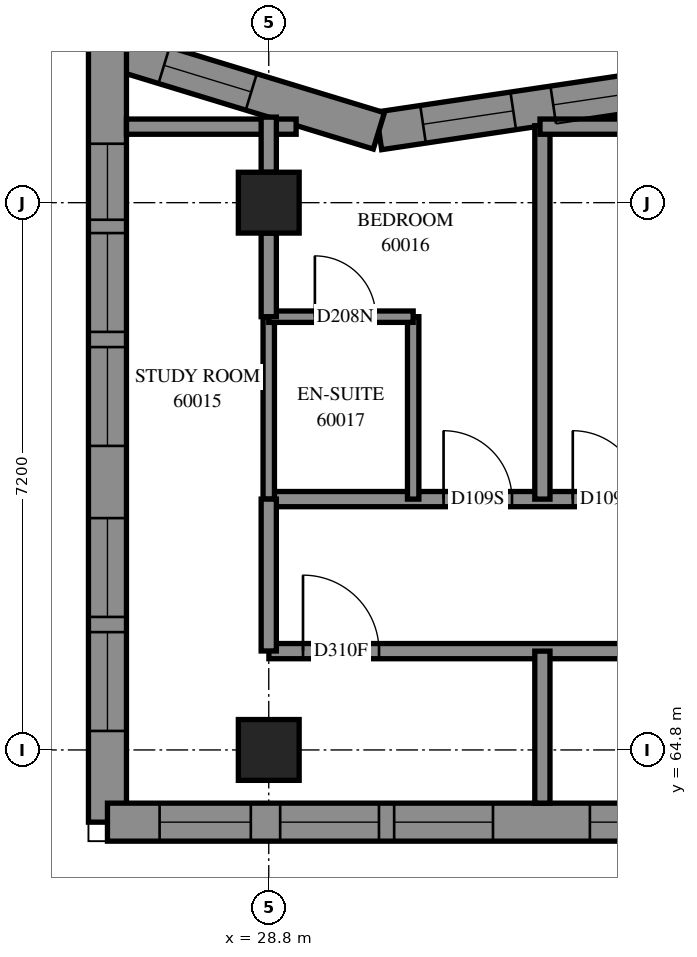
"""IFC4 building model, lengths in metres.
Left out: names, types, materials, properties, quantities, classifications, styles, units other than length and angle.
Written with IfcOpenShell. Run it as: python <this file> out.ifc"""

import sys

from ifc_helpers import new_model, si_unit, direction, frame, frame_2d, origin, origin_2d, place, context, subcontext, project, spatial, polyline, rectangle, outline, extrude, element, fill, save


model = new_model("IFC4")
c1 = context("Model", 3, precision=1e-05, world=origin(), true_north=direction((0.0, 1.0)))
c2 = subcontext(c1, "Body", "Model", "MODEL_VIEW")
j1 = project(units=[si_unit("LENGTHUNIT", "METRE"), si_unit("PLANEANGLEUNIT", "RADIAN")], contexts=[c1])
p1 = place(None, origin())
s1 = spatial("IfcSite", under=j1, at=p1, CompositionType="ELEMENT")
p2 = place(p1, origin())
s2 = spatial("IfcBuilding", under=s1, at=p2, CompositionType="ELEMENT")
p3 = place(p2, frame((0.0, 0.0, 220.2)))
s3 = spatial("IfcBuildingStorey", under=s2, at=p3, CompositionType="ELEMENT", Elevation=220.2)
for number, where, z_axis, x_axis in (
    (1, (28.8, 64.8, 0.0), (0.0, 0.0, 1.0), (1.0, 0.0, 0.0)),
    (2, (28.8, 72.0, 0.0), (0.0, 0.0, 1.0), (1.0, 0.0, 0.0)),
):
    element("IfcColumn", number, at=place(p3, frame(where, z_axis=z_axis, x_axis=x_axis)), inside=s3, PredefinedType="COLUMN", context=c2, shape_type="SweptSolid", body=[
        extrude(rectangle(XDim=0.8, YDim=0.8, at=origin_2d()), origin(), (0.0, 0.0, 1.0), 3.1),
    ])
p4 = place(p3, frame((34.107, 73.519, 0.0), z_axis=(0.0, 0.0, 1.0), x_axis=(-0.9890858863, -0.1473401149, 0.0)))
e3 = element("IfcWall", 3, at=p4, inside=s3, PredefinedType="SOLIDWALL", context=c2, shape_type="SweptSolid", body=[
    extrude(outline(polyline([(-0.037, -0.25), (3.845, -0.25), (3.958, 0.25), (0.037, 0.25), (-0.037, -0.25)])), origin(), (0.0, 0.0, 1.0), 3.1),
])
p5 = place(p4, frame((0.382, 0.0, 0.45)))
e4 = element("IfcOpeningElement", 4, at=p5, cuts=e3, PredefinedType="OPENING", context=c2, shape_type="SweptSolid", body=[
    extrude(rectangle(XDim=1.2, YDim=2.5, at=frame_2d((0.6, 1.25))), frame((0.0, 0.26, 0.0), z_axis=(0.0, -1.0, 0.0), x_axis=(1.0, 0.0, 0.0)), (0.0, 0.0, 1.0), 0.52),
])
p6 = place(p4, frame((2.114, 0.0, 0.45)))
e5 = element("IfcOpeningElement", 5, at=p6, cuts=e3, PredefinedType="OPENING", context=c2, shape_type="SweptSolid", body=[
    extrude(rectangle(XDim=1.2, YDim=2.5, at=frame_2d((0.6, 1.25))), frame((0.0, 0.26, 0.0), z_axis=(0.0, -1.0, 0.0), x_axis=(1.0, 0.0, 0.0)), (0.0, 0.0, 1.0), 0.52),
])
p7 = place(p3, frame((30.249, 72.944, 0.0), z_axis=(0.0, 0.0, 1.0), x_axis=(-0.9564351236, 0.2919449508, 0.0)))
e6 = element("IfcWall", 6, at=p7, inside=s3, PredefinedType="SOLIDWALL", context=c2, shape_type="SweptSolid", body=[
    extrude(outline(polyline([(0.056, -0.25), (4.071, -0.25), (3.396, 0.25), (-0.056, 0.25), (0.056, -0.25)])), origin(), (0.0, 0.0, 1.0), 3.1),
])
p8 = place(p7, frame((1.755, 0.0, 0.45)))
e7 = element("IfcOpeningElement", 7, at=p8, cuts=e6, PredefinedType="OPENING", context=c2, shape_type="SweptSolid", body=[
    extrude(rectangle(XDim=1.2, YDim=2.5, at=frame_2d((0.6, 1.25))), frame((0.0, 0.26, 0.0), z_axis=(0.0, -1.0, 0.0), x_axis=(1.0, 0.0, 0.0)), (0.0, 0.0, 1.0), 0.52),
])
p9 = place(p3, frame((26.678, 74.034, 0.0), z_axis=(0.0, 0.0, 1.0), x_axis=(0.0, -1.0, 0.0)))
e8 = element("IfcWall", 8, at=p9, inside=s3, PredefinedType="SOLIDWALL", context=c2, shape_type="SweptSolid", body=[
    extrude(outline(polyline([(-0.338, -0.25), (10.434, -0.25), (9.934, 0.25), (0.338, 0.25), (-0.338, -0.25)])), origin(), (0.0, 0.0, 1.0), 3.1),
])
p10 = place(p9, frame((2.434, 0.0, 0.45)))
e9 = element("IfcOpeningElement", 9, at=p10, cuts=e8, PredefinedType="OPENING", context=c2, shape_type="SweptSolid", body=[
    extrude(rectangle(XDim=1.3, YDim=2.5, at=frame_2d((0.65, 1.25))), frame((0.0, 0.26, 0.0), z_axis=(0.0, -1.0, 0.0), x_axis=(1.0, 0.0, 0.0)), (0.0, 0.0, 1.0), 0.52),
])
p11 = place(p9, frame((3.934, 0.0, 0.45)))
e10 = element("IfcOpeningElement", 10, at=p11, cuts=e8, PredefinedType="OPENING", context=c2, shape_type="SweptSolid", body=[
    extrude(rectangle(XDim=1.3, YDim=2.5, at=frame_2d((0.65, 1.25))), frame((0.0, 0.26, 0.0), z_axis=(0.0, -1.0, 0.0), x_axis=(1.0, 0.0, 0.0)), (0.0, 0.0, 1.0), 0.52),
])
p12 = place(p9, frame((6.184, 0.0, 0.45)))
e11 = element("IfcOpeningElement", 11, at=p12, cuts=e8, PredefinedType="OPENING", context=c2, shape_type="SweptSolid", body=[
    extrude(rectangle(XDim=1.3, YDim=2.5, at=frame_2d((0.65, 1.25))), frame((0.0, 0.26, 0.0), z_axis=(0.0, -1.0, 0.0), x_axis=(1.0, 0.0, 0.0)), (0.0, 0.0, 1.0), 0.52),
])
p13 = place(p9, frame((7.684, 0.0, 0.45)))
e12 = element("IfcOpeningElement", 12, at=p13, cuts=e8, PredefinedType="OPENING", context=c2, shape_type="SweptSolid", body=[
    extrude(rectangle(XDim=1.3, YDim=2.5, at=frame_2d((0.65, 1.25))), frame((0.0, 0.26, 0.0), z_axis=(0.0, -1.0, 0.0), x_axis=(1.0, 0.0, 0.0)), (0.0, 0.0, 1.0), 0.52),
])
p14 = place(p9, frame((1.259, 0.0, 0.45)))
e13 = element("IfcOpeningElement", 13, at=p14, cuts=e8, PredefinedType="OPENING", context=c2, shape_type="SweptSolid", body=[
    extrude(rectangle(XDim=1.0, YDim=2.5, at=frame_2d((0.5, 1.25))), frame((0.0, 0.26, 0.0), z_axis=(0.0, -1.0, 0.0), x_axis=(1.0, 0.0, 0.0)), (0.0, 0.0, 1.0), 0.52),
])
p15 = place(p3, frame((26.678, 63.85, 0.0), z_axis=(0.0, 0.0, 1.0), x_axis=(1.0, 0.0, 0.0)))
e14 = element("IfcWall", 14, at=p15, inside=s3, PredefinedType="SOLIDWALL", context=c2, shape_type="SweptSolid", body=[
    extrude(outline(polyline([(-0.25, -0.25), (8.122, -0.25), (8.622, 0.25), (0.25, 0.25), (-0.25, -0.25)])), origin(), (0.0, 0.0, 1.0), 3.1),
])
p16 = place(p15, frame((2.272, 0.0, 0.45)))
e15 = element("IfcOpeningElement", 15, at=p16, cuts=e14, PredefinedType="OPENING", context=c2, shape_type="SweptSolid", body=[
    extrude(rectangle(XDim=1.3, YDim=2.5, at=frame_2d((0.65, 1.25))), frame((0.0, 0.26, 0.0), z_axis=(0.0, -1.0, 0.0), x_axis=(1.0, 0.0, 0.0)), (0.0, 0.0, 1.0), 0.52),
])
p17 = place(p15, frame((3.772, 0.0, 0.45)))
e16 = element("IfcOpeningElement", 16, at=p17, cuts=e14, PredefinedType="OPENING", context=c2, shape_type="SweptSolid", body=[
    extrude(rectangle(XDim=1.3, YDim=2.5, at=frame_2d((0.65, 1.25))), frame((0.0, 0.26, 0.0), z_axis=(0.0, -1.0, 0.0), x_axis=(1.0, 0.0, 0.0)), (0.0, 0.0, 1.0), 0.52),
])
p18 = place(p15, frame((0.686, 0.0, 0.45)))
e17 = element("IfcOpeningElement", 17, at=p18, cuts=e14, PredefinedType="OPENING", context=c2, shape_type="SweptSolid", body=[
    extrude(rectangle(XDim=1.2, YDim=2.5, at=frame_2d((0.6, 1.25))), frame((0.0, 0.26, 0.0), z_axis=(0.0, -1.0, 0.0), x_axis=(1.0, 0.0, 0.0)), (0.0, 0.0, 1.0), 0.52),
])
p19 = place(p15, frame((6.347, 0.0, 0.45)))
e18 = element("IfcOpeningElement", 18, at=p19, cuts=e14, PredefinedType="OPENING", context=c2, shape_type="SweptSolid", body=[
    extrude(rectangle(XDim=1.2, YDim=2.5, at=frame_2d((0.6, 1.25))), frame((0.0, 0.26, 0.0), z_axis=(0.0, -1.0, 0.0), x_axis=(1.0, 0.0, 0.0)), (0.0, 0.0, 1.0), 0.52),
])
p20 = place(p3, frame((28.8, 68.1, 0.0), z_axis=(0.0, 0.0, 1.0), x_axis=(1.0, 0.0, 0.0)))
e19 = element("IfcWall", 19, at=p20, inside=s3, PredefinedType="PARTITIONING", context=c2, shape_type="SweptSolid", body=[
    extrude(rectangle(XDim=11.8, YDim=0.2, at=frame_2d((5.9, 0.0))), origin(), (0.0, 0.0, 1.0), 3.1),
])
p21 = place(p20, frame((2.3, 0.0, 0.0)))
e20 = element("IfcOpeningElement", 20, at=p21, cuts=e19, PredefinedType="OPENING", context=c2, shape_type="SweptSolid", body=[
    extrude(rectangle(XDim=0.9, YDim=2.1, at=frame_2d((0.45, 1.05))), frame((0.0, 0.11, 0.0), z_axis=(0.0, -1.0, 0.0), x_axis=(1.0, 0.0, 0.0)), (0.0, 0.0, 1.0), 0.22),
])
p22 = place(p20, frame((4.0, 0.0, 0.0)))
e21 = element("IfcOpeningElement", 21, at=p22, cuts=e19, PredefinedType="OPENING", context=c2, shape_type="SweptSolid", body=[
    extrude(rectangle(XDim=0.9, YDim=2.1, at=frame_2d((0.45, 1.05))), frame((0.0, 0.11, 0.0), z_axis=(0.0, -1.0, 0.0), x_axis=(1.0, 0.0, 0.0)), (0.0, 0.0, 1.0), 0.22),
])
p23 = place(p20, frame((9.5, 0.0, 0.0)))
e22 = element("IfcOpeningElement", 22, at=p23, cuts=e19, PredefinedType="OPENING", context=c2, shape_type="SweptSolid", body=[
    extrude(rectangle(XDim=0.9, YDim=2.1, at=frame_2d((0.45, 1.05))), frame((0.0, 0.11, 0.0), z_axis=(0.0, -1.0, 0.0), x_axis=(1.0, 0.0, 0.0)), (0.0, 0.0, 1.0), 0.22),
])
p24 = place(p3, frame((28.802, 66.1, 0.0), z_axis=(0.0, 0.0, 1.0), x_axis=(1.0, 0.0, 0.0)))
e23 = element("IfcWall", 23, at=p24, inside=s3, PredefinedType="PARTITIONING", context=c2, shape_type="SweptSolid", body=[
    extrude(rectangle(XDim=9.798, YDim=0.2, at=frame_2d((4.899, 0.0))), origin(), (0.0, 0.0, 1.0), 3.1),
])
p25 = place(p24, frame((0.449, 0.0, 0.0)))
e24 = element("IfcOpeningElement", 24, at=p25, cuts=e23, PredefinedType="OPENING", context=c2, shape_type="SweptSolid", body=[
    extrude(rectangle(XDim=1.0, YDim=2.1, at=frame_2d((0.5, 1.05))), frame((0.0, 0.11, 0.0), z_axis=(0.0, -1.0, 0.0), x_axis=(1.0, 0.0, 0.0)), (0.0, 0.0, 1.0), 0.22),
])
p26 = place(p24, frame((5.459, 0.0, 0.0)))
e25 = element("IfcOpeningElement", 25, at=p26, cuts=e23, PredefinedType="OPENING", context=c2, shape_type="SweptSolid", body=[
    extrude(rectangle(XDim=1.0, YDim=2.1, at=frame_2d((0.5, 1.05))), frame((0.0, 0.11, 0.0), z_axis=(0.0, -1.0, 0.0), x_axis=(1.0, 0.0, 0.0)), (0.0, 0.0, 1.0), 0.22),
])
p27 = place(p3, frame((32.4, 68.1, 0.0), z_axis=(0.0, 0.0, 1.0), x_axis=(0.0, 1.0, 0.0)))
e26 = element("IfcWall", 26, at=p27, inside=s3, PredefinedType="PARTITIONING", context=c2, shape_type="SweptSolid", body=[
    extrude(rectangle(XDim=4.912, YDim=0.2, at=frame_2d((2.456, 0.0))), origin(), (0.0, 0.0, 1.0), 3.1),
])
p28 = place(p3, frame((32.368, 73.0, 0.0), z_axis=(0.0, 0.0, 1.0), x_axis=(1.0, 0.0, 0.0)))
e27 = element("IfcWall", 27, at=p28, inside=s3, PredefinedType="PARTITIONING", context=c2, shape_type="SweptSolid", body=[
    extrude(rectangle(XDim=3.478, YDim=0.2, at=frame_2d((1.739, 0.0))), origin(), (0.0, 0.0, 1.0), 3.1),
])
p29 = place(p3, frame((28.8, 68.1, 0.0), z_axis=(0.0, 0.0, 1.0), x_axis=(0.0, 1.0, 0.0)))
e28 = element("IfcWall", 28, at=p29, inside=s3, PredefinedType="PARTITIONING", context=c2, shape_type="SweptSolid", body=[
    extrude(rectangle(XDim=2.4, YDim=0.15, at=frame_2d((1.2, 0.0))), origin(), (0.0, 0.0, 1.0), 2.6),
])
p30 = place(p3, frame((30.7, 68.1, 0.0), z_axis=(0.0, 0.0, 1.0), x_axis=(0.0, 1.0, 0.0)))
e29 = element("IfcWall", 29, at=p30, inside=s3, PredefinedType="PARTITIONING", context=c2, shape_type="SweptSolid", body=[
    extrude(rectangle(XDim=2.4, YDim=0.15, at=frame_2d((1.2, 0.0))), origin(), (0.0, 0.0, 1.0), 3.1),
])
p31 = place(p3, frame((26.928, 73.0, 0.0), z_axis=(0.0, 0.0, 1.0), x_axis=(1.0, 0.0, 0.0)))
e30 = element("IfcWall", 30, at=p31, inside=s3, PredefinedType="PARTITIONING", context=c2, shape_type="SweptSolid", body=[
    extrude(rectangle(XDim=2.232, YDim=0.2, at=frame_2d((1.116, 0.0))), origin(), (0.0, 0.0, 1.0), 3.1),
])
p32 = place(p3, frame((28.8, 66.102, 0.0), z_axis=(0.0, 0.0, 1.0), x_axis=(0.0, 1.0, 0.0)))
e31 = element("IfcWall", 31, at=p32, inside=s3, PredefinedType="PARTITIONING", context=c2, shape_type="SweptSolid", body=[
    extrude(rectangle(XDim=1.998, YDim=0.2, at=frame_2d((0.999, 0.0))), origin(), (0.0, 0.0, 1.0), 2.6),
])
p33 = place(p3, frame((32.4, 64.1, 0.0), z_axis=(0.0, 0.0, 1.0), x_axis=(0.0, 1.0, 0.0)))
e32 = element("IfcWall", 32, at=p33, inside=s3, PredefinedType="PARTITIONING", context=c2, shape_type="SweptSolid", body=[
    extrude(rectangle(XDim=2.0, YDim=0.2, at=frame_2d((1.0, 0.0))), origin(), (0.0, 0.0, 1.0), 3.1),
])
p34 = place(p3, frame((28.8, 70.5, 0.0), z_axis=(0.0, 0.0, 1.0), x_axis=(1.0, 0.0, 0.0)))
e33 = element("IfcWall", 33, at=p34, inside=s3, PredefinedType="PARTITIONING", context=c2, shape_type="SweptSolid", body=[
    extrude(rectangle(XDim=1.9, YDim=0.15, at=frame_2d((0.95, 0.0))), origin(), (0.0, 0.0, 1.0), 3.1),
])
p35 = place(p34, frame((0.607, 0.0, 0.0)))
e34 = element("IfcOpeningElement", 34, at=p35, cuts=e33, PredefinedType="OPENING", context=c2, shape_type="SweptSolid", body=[
    extrude(rectangle(XDim=0.8, YDim=2.1, at=frame_2d((0.4, 1.05))), frame((0.0, 0.085, 0.0), z_axis=(0.0, -1.0, 0.0), x_axis=(1.0, 0.0, 0.0)), (0.0, 0.0, 1.0), 0.17),
])
p36 = place(p3, frame((28.8, 70.5, 0.0), z_axis=(0.0, 0.0, 1.0), x_axis=(0.0, 1.0, 0.0)))
e35 = element("IfcWall", 35, at=p36, inside=s3, PredefinedType="PARTITIONING", context=c2, shape_type="SweptSolid", body=[
    extrude(rectangle(XDim=1.1, YDim=0.2, at=frame_2d((0.55, 0.0))), origin(), (0.0, 0.0, 1.0), 2.6),
])
p37 = place(p3, frame((28.8, 72.4, 0.0), z_axis=(0.0, 0.0, 1.0), x_axis=(0.0, 1.0, 0.0)))
e36 = element("IfcWall", 36, at=p37, inside=s3, PredefinedType="PARTITIONING", context=c2, shape_type="SweptSolid", body=[
    extrude(rectangle(XDim=0.725, YDim=0.2, at=frame_2d((0.363, 0.0))), origin(), (0.0, 0.0, 1.0), 3.1),
])
p38 = place(p5, origin())
e37 = element("IfcWindow", 37, at=p38, inside=s3, PartitioningType="SINGLE_PANEL", PredefinedType="WINDOW", context=c2, shape_type="SweptSolid", body=[
    extrude(rectangle(XDim=1.2, YDim=2.5, at=frame_2d((0.6, 1.25))), frame((0.0, 0.15, 0.0), z_axis=(0.0, -1.0, 0.0), x_axis=(1.0, 0.0, 0.0)), (0.0, 0.0, 1.0), 0.06),
])
fill(e4, e37)
p39 = place(p6, origin())
e38 = element("IfcWindow", 38, at=p39, inside=s3, PartitioningType="SINGLE_PANEL", PredefinedType="WINDOW", context=c2, shape_type="SweptSolid", body=[
    extrude(rectangle(XDim=1.2, YDim=2.5, at=frame_2d((0.6, 1.25))), frame((0.0, 0.18, 0.0), z_axis=(0.0, -1.0, 0.0), x_axis=(1.0, 0.0, 0.0)), (0.0, 0.0, 1.0), 0.06),
])
fill(e5, e38)
p40 = place(p8, origin())
e39 = element("IfcWindow", 39, at=p40, inside=s3, PartitioningType="SINGLE_PANEL", PredefinedType="WINDOW", context=c2, shape_type="SweptSolid", body=[
    extrude(rectangle(XDim=1.2, YDim=2.5, at=frame_2d((0.6, 1.25))), frame((0.0, 0.18, 0.0), z_axis=(0.0, -1.0, 0.0), x_axis=(1.0, 0.0, 0.0)), (0.0, 0.0, 1.0), 0.06),
])
fill(e7, e39)
p41 = place(p10, origin())
e40 = element("IfcWindow", 40, at=p41, inside=s3, PartitioningType="SINGLE_PANEL", PredefinedType="WINDOW", context=c2, shape_type="SweptSolid", body=[
    extrude(rectangle(XDim=1.3, YDim=2.5, at=frame_2d((0.65, 1.25))), frame((0.0, 0.18, 0.0), z_axis=(0.0, -1.0, 0.0), x_axis=(1.0, 0.0, 0.0)), (0.0, 0.0, 1.0), 0.06),
])
fill(e9, e40)
p42 = place(p11, origin())
e41 = element("IfcWindow", 41, at=p42, inside=s3, PartitioningType="SINGLE_PANEL", PredefinedType="WINDOW", context=c2, shape_type="SweptSolid", body=[
    extrude(rectangle(XDim=1.3, YDim=2.5, at=frame_2d((0.65, 1.25))), frame((0.0, 0.18, 0.0), z_axis=(0.0, -1.0, 0.0), x_axis=(1.0, 0.0, 0.0)), (0.0, 0.0, 1.0), 0.06),
])
fill(e10, e41)
p43 = place(p12, origin())
e42 = element("IfcWindow", 42, at=p43, inside=s3, PartitioningType="SINGLE_PANEL", PredefinedType="WINDOW", context=c2, shape_type="SweptSolid", body=[
    extrude(rectangle(XDim=1.3, YDim=2.5, at=frame_2d((0.65, 1.25))), frame((0.0, 0.18, 0.0), z_axis=(0.0, -1.0, 0.0), x_axis=(1.0, 0.0, 0.0)), (0.0, 0.0, 1.0), 0.06),
])
fill(e11, e42)
p44 = place(p13, origin())
e43 = element("IfcWindow", 43, at=p44, inside=s3, PartitioningType="SINGLE_PANEL", PredefinedType="WINDOW", context=c2, shape_type="SweptSolid", body=[
    extrude(rectangle(XDim=1.3, YDim=2.5, at=frame_2d((0.65, 1.25))), frame((0.0, 0.18, 0.0), z_axis=(0.0, -1.0, 0.0), x_axis=(1.0, 0.0, 0.0)), (0.0, 0.0, 1.0), 0.06),
])
fill(e12, e43)
p45 = place(p16, origin())
e44 = element("IfcWindow", 44, at=p45, inside=s3, PartitioningType="SINGLE_PANEL", PredefinedType="WINDOW", context=c2, shape_type="SweptSolid", body=[
    extrude(rectangle(XDim=1.3, YDim=2.5, at=frame_2d((0.65, 1.25))), frame((0.0, 0.18, 0.0), z_axis=(0.0, -1.0, 0.0), x_axis=(1.0, 0.0, 0.0)), (0.0, 0.0, 1.0), 0.06),
])
fill(e15, e44)
p46 = place(p17, origin())
e45 = element("IfcWindow", 45, at=p46, inside=s3, PartitioningType="SINGLE_PANEL", PredefinedType="WINDOW", context=c2, shape_type="SweptSolid", body=[
    extrude(rectangle(XDim=1.3, YDim=2.5, at=frame_2d((0.65, 1.25))), frame((0.0, 0.18, 0.0), z_axis=(0.0, -1.0, 0.0), x_axis=(1.0, 0.0, 0.0)), (0.0, 0.0, 1.0), 0.06),
])
fill(e16, e45)
p47 = place(p18, origin())
e46 = element("IfcWindow", 46, at=p47, inside=s3, PartitioningType="SINGLE_PANEL", PredefinedType="WINDOW", context=c2, shape_type="SweptSolid", body=[
    extrude(rectangle(XDim=1.2, YDim=2.5, at=frame_2d((0.6, 1.25))), frame((0.0, 0.18, 0.0), z_axis=(0.0, -1.0, 0.0), x_axis=(1.0, 0.0, 0.0)), (0.0, 0.0, 1.0), 0.06),
])
fill(e17, e46)
p48 = place(p19, origin())
e47 = element("IfcWindow", 47, at=p48, inside=s3, PartitioningType="SINGLE_PANEL", PredefinedType="WINDOW", context=c2, shape_type="SweptSolid", body=[
    extrude(rectangle(XDim=1.2, YDim=2.5, at=frame_2d((0.6, 1.25))), frame((0.0, 0.18, 0.0), z_axis=(0.0, -1.0, 0.0), x_axis=(1.0, 0.0, 0.0)), (0.0, 0.0, 1.0), 0.06),
])
fill(e18, e47)
p49 = place(p25, origin())
e48 = element("IfcDoor", 48, at=p49, inside=s3, OperationType="SINGLE_SWING_LEFT", PredefinedType="DOOR", context=c2, shape_type="SweptSolid", body=[
    extrude(rectangle(XDim=1.0, YDim=2.1, at=frame_2d((0.5, 1.05))), frame((0.0, 0.025, 0.0), z_axis=(0.0, -1.0, 0.0), x_axis=(1.0, 0.0, 0.0)), (0.0, 0.0, 1.0), 0.05),
])
fill(e24, e48)
p50 = place(p21, origin())
e49 = element("IfcDoor", 49, at=p50, inside=s3, OperationType="SINGLE_SWING_RIGHT", PredefinedType="DOOR", context=c2, shape_type="SweptSolid", body=[
    extrude(rectangle(XDim=0.9, YDim=2.1, at=frame_2d((0.45, 1.05))), frame((0.0, 0.025, 0.0), z_axis=(0.0, -1.0, 0.0), x_axis=(1.0, 0.0, 0.0)), (0.0, 0.0, 1.0), 0.05),
])
fill(e20, e49)
p51 = place(p35, origin())
e50 = element("IfcDoor", 50, at=p51, inside=s3, OperationType="SINGLE_SWING_RIGHT", PredefinedType="DOOR", context=c2, shape_type="SweptSolid", body=[
    extrude(rectangle(XDim=0.8, YDim=2.1, at=frame_2d((0.4, 1.05))), frame((0.0, 0.025, 0.0), z_axis=(0.0, -1.0, 0.0), x_axis=(1.0, 0.0, 0.0)), (0.0, 0.0, 1.0), 0.05),
])
fill(e34, e50)
p52 = place(p22, origin())
e51 = element("IfcDoor", 51, at=p52, inside=s3, OperationType="SINGLE_SWING_LEFT", PredefinedType="DOOR", context=c2, shape_type="SweptSolid", body=[
    extrude(rectangle(XDim=0.9, YDim=2.1, at=frame_2d((0.45, 1.05))), frame((0.0, 0.025, 0.0), z_axis=(0.0, -1.0, 0.0), x_axis=(1.0, 0.0, 0.0)), (0.0, 0.0, 1.0), 0.05),
])
fill(e21, e51)
p53 = place(p14, origin())
e52 = element("IfcWindow", 52, at=p53, inside=s3, PartitioningType="SINGLE_PANEL", PredefinedType="WINDOW", context=c2, shape_type="SweptSolid", body=[
    extrude(rectangle(XDim=1.0, YDim=2.5, at=frame_2d((0.5, 1.25))), frame((0.0, 0.18, 0.0), z_axis=(0.0, -1.0, 0.0), x_axis=(1.0, 0.0, 0.0)), (0.0, 0.0, 1.0), 0.06),
])
fill(e13, e52)
save(model, sys.argv[1])
